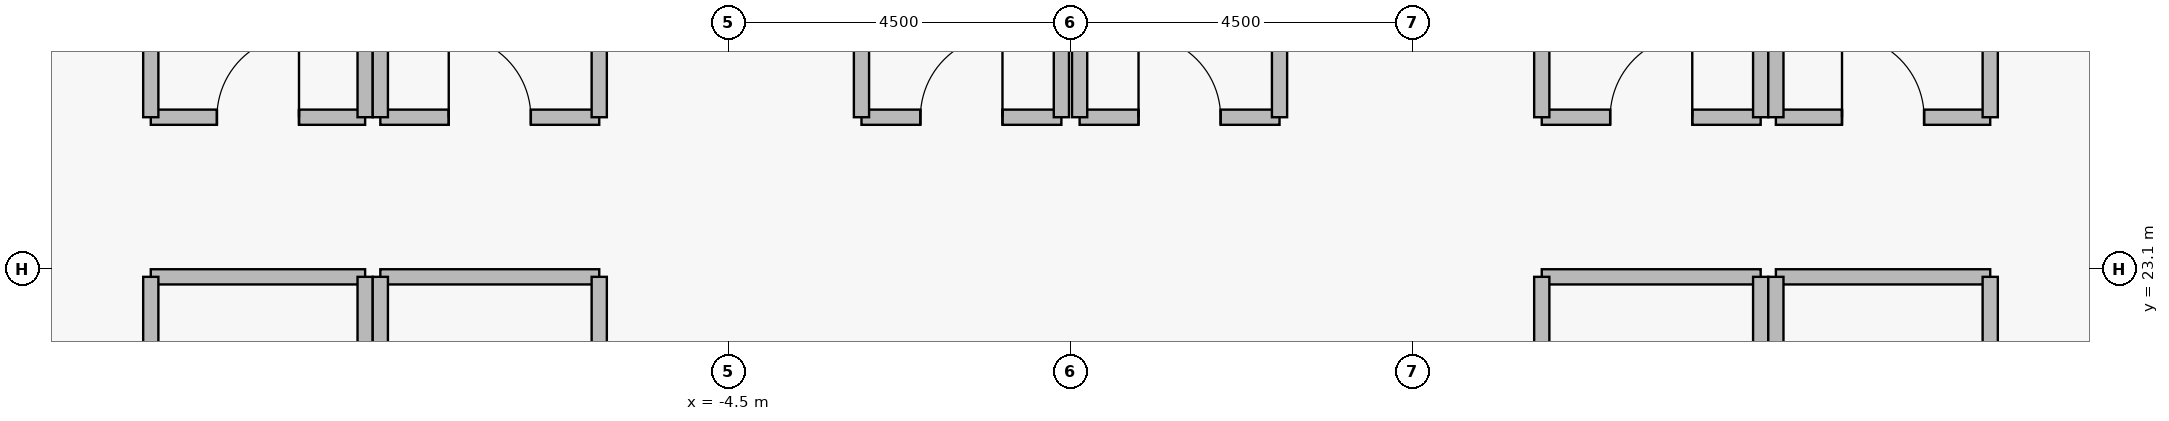
"""IFC4 building model, lengths in metres.
Left out: names, types, materials, properties, quantities, classifications, styles, units other than length and angle.
Written with IfcOpenShell. Run it as: python <this file> out.ifc"""

import sys

from ifc_helpers import new_model, si_unit, direction, frame, frame_2d, origin, place, context, subcontext, project, spatial, rectangle, extrude, element, fill, save


model = new_model("IFC4")
c1 = context("Model", 3, precision=1e-05, world=origin(), true_north=direction((0.0, 1.0)))
c2 = subcontext(c1, "Body", "Model", "MODEL_VIEW")
j1 = project(units=[si_unit("LENGTHUNIT", "METRE"), si_unit("PLANEANGLEUNIT", "RADIAN")], contexts=[c1])
p1 = place(None, origin())
s1 = spatial("IfcSite", under=j1, at=p1, CompositionType="ELEMENT")
p2 = place(p1, origin())
s2 = spatial("IfcBuilding", under=s1, at=p2, CompositionType="ELEMENT")
p3 = place(p2, frame((0.0, 0.0, 233.65)))
s3 = spatial("IfcBuildingStorey", under=s2, at=p3, CompositionType="ELEMENT", Elevation=233.65)
p4 = place(p3, frame((-12.1, 25.1, 0.0), z_axis=(0.0, 0.0, 1.0), x_axis=(1.0, 0.0, 0.0)))
e1 = element("IfcWall", 1, at=p4, inside=s3, PredefinedType="PARTITIONING", context=c2, shape_type="SweptSolid", body=[
    extrude(rectangle(XDim=2.82, YDim=0.2, at=frame_2d((1.41, 0.0))), origin(), (0.0, 0.0, 1.0), 5.336),
])
p5 = place(p4, frame((0.87, 0.0, 0.0)))
e2 = element("IfcOpeningElement", 2, at=p5, cuts=e1, PredefinedType="OPENING", context=c2, shape_type="SweptSolid", body=[
    extrude(rectangle(XDim=1.08, YDim=2.18, at=frame_2d((0.54, 1.09))), frame((0.0, 0.11, 0.0), z_axis=(0.0, -1.0, 0.0), x_axis=(1.0, 0.0, 0.0)), (0.0, 0.0, 1.0), 0.22),
])
p6 = place(p3, frame((-9.08, 25.1, 0.0), z_axis=(0.0, 0.0, 1.0), x_axis=(1.0, 0.0, 0.0)))
e3 = element("IfcWall", 3, at=p6, inside=s3, PredefinedType="PARTITIONING", context=c2, shape_type="SweptSolid", body=[
    extrude(rectangle(XDim=2.88, YDim=0.2, at=frame_2d((1.44, 0.0))), origin(), (0.0, 0.0, 1.0), 5.336),
])
p7 = place(p6, frame((0.9, 0.0, 0.0)))
e4 = element("IfcOpeningElement", 4, at=p7, cuts=e3, PredefinedType="OPENING", context=c2, shape_type="SweptSolid", body=[
    extrude(rectangle(XDim=1.08, YDim=2.18, at=frame_2d((0.54, 1.09))), frame((0.0, 0.11, 0.0), z_axis=(0.0, -1.0, 0.0), x_axis=(1.0, 0.0, 0.0)), (0.0, 0.0, 1.0), 0.22),
])
p8 = place(p3, frame((-2.75, 25.1, 0.0), z_axis=(0.0, 0.0, 1.0), x_axis=(1.0, 0.0, 0.0)))
e5 = element("IfcWall", 5, at=p8, inside=s3, PredefinedType="PARTITIONING", context=c2, shape_type="SweptSolid", body=[
    extrude(rectangle(XDim=2.63, YDim=0.2, at=frame_2d((1.315, 0.0))), origin(), (0.0, 0.0, 1.0), 5.336),
])
p9 = place(p8, frame((0.775, 0.0, 0.0)))
e6 = element("IfcOpeningElement", 6, at=p9, cuts=e5, PredefinedType="OPENING", context=c2, shape_type="SweptSolid", body=[
    extrude(rectangle(XDim=1.08, YDim=2.18, at=frame_2d((0.54, 1.09))), frame((0.0, 0.11, 0.0), z_axis=(0.0, -1.0, 0.0), x_axis=(1.0, 0.0, 0.0)), (0.0, 0.0, 1.0), 0.22),
])
p10 = place(p3, frame((0.12, 25.1, 0.0), z_axis=(0.0, 0.0, 1.0), x_axis=(1.0, 0.0, 0.0)))
e7 = element("IfcWall", 7, at=p10, inside=s3, PredefinedType="PARTITIONING", context=c2, shape_type="SweptSolid", body=[
    extrude(rectangle(XDim=2.63, YDim=0.2, at=frame_2d((1.315, 0.0))), origin(), (0.0, 0.0, 1.0), 5.336),
])
p11 = place(p10, frame((0.775, 0.0, 0.0)))
e8 = element("IfcOpeningElement", 8, at=p11, cuts=e7, PredefinedType="OPENING", context=c2, shape_type="SweptSolid", body=[
    extrude(rectangle(XDim=1.08, YDim=2.18, at=frame_2d((0.54, 1.09))), frame((0.0, 0.11, 0.0), z_axis=(0.0, -1.0, 0.0), x_axis=(1.0, 0.0, 0.0)), (0.0, 0.0, 1.0), 0.22),
])
p12 = place(p3, frame((6.2, 25.1, 0.0), z_axis=(0.0, 0.0, 1.0), x_axis=(1.0, 0.0, 0.0)))
e9 = element("IfcWall", 9, at=p12, inside=s3, PredefinedType="PARTITIONING", context=c2, shape_type="SweptSolid", body=[
    extrude(rectangle(XDim=2.88, YDim=0.2, at=frame_2d((1.44, 0.0))), origin(), (0.0, 0.0, 1.0), 5.336),
])
p13 = place(p12, frame((0.9, 0.0, 0.0)))
e10 = element("IfcOpeningElement", 10, at=p13, cuts=e9, PredefinedType="OPENING", context=c2, shape_type="SweptSolid", body=[
    extrude(rectangle(XDim=1.08, YDim=2.18, at=frame_2d((0.54, 1.09))), frame((0.0, 0.11, 0.0), z_axis=(0.0, -1.0, 0.0), x_axis=(1.0, 0.0, 0.0)), (0.0, 0.0, 1.0), 0.22),
])
p14 = place(p3, frame((9.28, 25.1, 0.0), z_axis=(0.0, 0.0, 1.0), x_axis=(1.0, 0.0, 0.0)))
e11 = element("IfcWall", 11, at=p14, inside=s3, PredefinedType="PARTITIONING", context=c2, shape_type="SweptSolid", body=[
    extrude(rectangle(XDim=2.82, YDim=0.2, at=frame_2d((1.41, 0.0))), origin(), (0.0, 0.0, 1.0), 5.336),
])
p15 = place(p14, frame((0.87, 0.0, 0.0)))
e12 = element("IfcOpeningElement", 12, at=p15, cuts=e11, PredefinedType="OPENING", context=c2, shape_type="SweptSolid", body=[
    extrude(rectangle(XDim=1.08, YDim=2.18, at=frame_2d((0.54, 1.09))), frame((0.0, 0.11, 0.0), z_axis=(0.0, -1.0, 0.0), x_axis=(1.0, 0.0, 0.0)), (0.0, 0.0, 1.0), 0.22),
])
p16 = place(p3, frame((-12.1, 23.0, 0.0), z_axis=(0.0, 0.0, 1.0), x_axis=(1.0, 0.0, 0.0)))
e13 = element("IfcWall", 13, at=p16, inside=s3, PredefinedType="PARTITIONING", context=c2, shape_type="SweptSolid", body=[
    extrude(rectangle(XDim=2.82, YDim=0.2, at=frame_2d((1.41, 0.0))), origin(), (0.0, 0.0, 1.0), 5.74),
])
for number, where, z_axis, x_axis in (
    (14, (-12.1, 17.1, 0.0), (0.0, 0.0, 1.0), (0.0, 1.0, 0.0)),
    (15, (-9.28, 17.1, 0.0), (0.0, 0.0, 1.0), (0.0, 1.0, 0.0)),
):
    element("IfcWall", number, at=place(p3, frame(where, z_axis=z_axis, x_axis=x_axis)), inside=s3, PredefinedType="PARTITIONING", context=c2, shape_type="SweptSolid", body=[
        extrude(rectangle(XDim=5.9, YDim=0.2, at=frame_2d((2.95, 0.0))), origin(), (0.0, 0.0, 1.0), 5.74),
    ])
p17 = place(p3, frame((-9.08, 23.0, 0.0), z_axis=(0.0, 0.0, 1.0), x_axis=(1.0, 0.0, 0.0)))
e16 = element("IfcWall", 16, at=p17, inside=s3, PredefinedType="PARTITIONING", context=c2, shape_type="SweptSolid", body=[
    extrude(rectangle(XDim=2.88, YDim=0.2, at=frame_2d((1.44, 0.0))), origin(), (0.0, 0.0, 1.0), 5.74),
])
for number, where, z_axis, x_axis in (
    (17, (-9.08, 17.1, 0.0), (0.0, 0.0, 1.0), (0.0, 1.0, 0.0)),
    (18, (-6.2, 17.1, 0.0), (0.0, 0.0, 1.0), (0.0, 1.0, 0.0)),
):
    element("IfcWall", number, at=place(p3, frame(where, z_axis=z_axis, x_axis=x_axis)), inside=s3, PredefinedType="PARTITIONING", context=c2, shape_type="SweptSolid", body=[
        extrude(rectangle(XDim=5.9, YDim=0.2, at=frame_2d((2.95, 0.0))), origin(), (0.0, 0.0, 1.0), 5.74),
    ])
p18 = place(p3, frame((6.2, 23.0, 0.0), z_axis=(0.0, 0.0, 1.0), x_axis=(1.0, 0.0, 0.0)))
e19 = element("IfcWall", 19, at=p18, inside=s3, PredefinedType="PARTITIONING", context=c2, shape_type="SweptSolid", body=[
    extrude(rectangle(XDim=2.88, YDim=0.2, at=frame_2d((1.44, 0.0))), origin(), (0.0, 0.0, 1.0), 5.74),
])
for number, where, z_axis, x_axis in (
    (20, (6.2, 17.1, 0.0), (0.0, 0.0, 1.0), (0.0, 1.0, 0.0)),
    (21, (9.08, 17.1, 0.0), (0.0, 0.0, 1.0), (0.0, 1.0, 0.0)),
):
    element("IfcWall", number, at=place(p3, frame(where, z_axis=z_axis, x_axis=x_axis)), inside=s3, PredefinedType="PARTITIONING", context=c2, shape_type="SweptSolid", body=[
        extrude(rectangle(XDim=5.9, YDim=0.2, at=frame_2d((2.95, 0.0))), origin(), (0.0, 0.0, 1.0), 5.74),
    ])
p19 = place(p3, frame((9.28, 23.0, 0.0), z_axis=(0.0, 0.0, 1.0), x_axis=(1.0, 0.0, 0.0)))
e22 = element("IfcWall", 22, at=p19, inside=s3, PredefinedType="PARTITIONING", context=c2, shape_type="SweptSolid", body=[
    extrude(rectangle(XDim=2.82, YDim=0.2, at=frame_2d((1.41, 0.0))), origin(), (0.0, 0.0, 1.0), 5.74),
])
for number, where, z_axis, x_axis in (
    (23, (9.28, 17.1, 0.0), (0.0, 0.0, 1.0), (0.0, 1.0, 0.0)),
    (24, (12.1, 17.1, 0.0), (0.0, 0.0, 1.0), (0.0, 1.0, 0.0)),
):
    element("IfcWall", number, at=place(p3, frame(where, z_axis=z_axis, x_axis=x_axis)), inside=s3, PredefinedType="PARTITIONING", context=c2, shape_type="SweptSolid", body=[
        extrude(rectangle(XDim=5.9, YDim=0.2, at=frame_2d((2.95, 0.0))), origin(), (0.0, 0.0, 1.0), 5.74),
    ])
for number, where, z_axis, x_axis in (
    (25, (-12.1, 25.1, 0.0), (0.0, 0.0, 1.0), (0.0, 1.0, 0.0)),
    (26, (-9.28, 25.1, 0.0), (0.0, 0.0, 1.0), (0.0, 1.0, 0.0)),
    (27, (-9.08, 25.1, 0.0), (0.0, 0.0, 1.0), (0.0, 1.0, 0.0)),
    (28, (-6.2, 25.1, 0.0), (0.0, 0.0, 1.0), (0.0, 1.0, 0.0)),
    (29, (-2.75, 25.1, 0.0), (0.0, 0.0, 1.0), (0.0, 1.0, 0.0)),
    (30, (-0.12, 25.1, 0.0), (0.0, 0.0, 1.0), (0.0, 1.0, 0.0)),
    (31, (0.12, 25.1, 0.0), (0.0, 0.0, 1.0), (0.0, 1.0, 0.0)),
    (32, (2.75, 25.1, 0.0), (0.0, 0.0, 1.0), (0.0, 1.0, 0.0)),
    (33, (6.2, 25.1, 0.0), (0.0, 0.0, 1.0), (0.0, 1.0, 0.0)),
    (34, (9.08, 25.1, 0.0), (0.0, 0.0, 1.0), (0.0, 1.0, 0.0)),
    (35, (9.28, 25.1, 0.0), (0.0, 0.0, 1.0), (0.0, 1.0, 0.0)),
    (36, (12.1, 25.1, 0.0), (0.0, 0.0, 1.0), (0.0, 1.0, 0.0)),
):
    element("IfcWall", number, at=place(p3, frame(where, z_axis=z_axis, x_axis=x_axis)), inside=s3, PredefinedType="PARTITIONING", context=c2, shape_type="SweptSolid", body=[
        extrude(rectangle(XDim=6.1, YDim=0.2, at=frame_2d((3.05, 0.0))), origin(), (0.0, 0.0, 1.0), 5.74),
    ])
p20 = place(p5, origin())
e37 = element("IfcDoor", 37, at=p20, inside=s3, OperationType="SINGLE_SWING_RIGHT", PredefinedType="DOOR", context=c2, shape_type="SweptSolid", body=[
    extrude(rectangle(XDim=1.08, YDim=2.18, at=frame_2d((0.54, 1.09))), frame((0.0, 0.025, 0.0), z_axis=(0.0, -1.0, 0.0), x_axis=(1.0, 0.0, 0.0)), (0.0, 0.0, 1.0), 0.05),
])
fill(e2, e37)
p21 = place(p7, origin())
e38 = element("IfcDoor", 38, at=p21, inside=s3, OperationType="SINGLE_SWING_LEFT", PredefinedType="DOOR", context=c2, shape_type="SweptSolid", body=[
    extrude(rectangle(XDim=1.08, YDim=2.18, at=frame_2d((0.54, 1.09))), frame((0.0, 0.025, 0.0), z_axis=(0.0, -1.0, 0.0), x_axis=(1.0, 0.0, 0.0)), (0.0, 0.0, 1.0), 0.05),
])
fill(e4, e38)
p22 = place(p9, origin())
e39 = element("IfcDoor", 39, at=p22, inside=s3, OperationType="SINGLE_SWING_RIGHT", PredefinedType="DOOR", context=c2, shape_type="SweptSolid", body=[
    extrude(rectangle(XDim=1.08, YDim=2.18, at=frame_2d((0.54, 1.09))), frame((0.0, 0.025, 0.0), z_axis=(0.0, -1.0, 0.0), x_axis=(1.0, 0.0, 0.0)), (0.0, 0.0, 1.0), 0.05),
])
fill(e6, e39)
p23 = place(p11, origin())
e40 = element("IfcDoor", 40, at=p23, inside=s3, OperationType="SINGLE_SWING_LEFT", PredefinedType="DOOR", context=c2, shape_type="SweptSolid", body=[
    extrude(rectangle(XDim=1.08, YDim=2.18, at=frame_2d((0.54, 1.09))), frame((0.0, 0.025, 0.0), z_axis=(0.0, -1.0, 0.0), x_axis=(1.0, 0.0, 0.0)), (0.0, 0.0, 1.0), 0.05),
])
fill(e8, e40)
p24 = place(p13, origin())
e41 = element("IfcDoor", 41, at=p24, inside=s3, OperationType="SINGLE_SWING_RIGHT", PredefinedType="DOOR", context=c2, shape_type="SweptSolid", body=[
    extrude(rectangle(XDim=1.08, YDim=2.18, at=frame_2d((0.54, 1.09))), frame((0.0, 0.025, 0.0), z_axis=(0.0, -1.0, 0.0), x_axis=(1.0, 0.0, 0.0)), (0.0, 0.0, 1.0), 0.05),
])
fill(e10, e41)
p25 = place(p15, origin())
e42 = element("IfcDoor", 42, at=p25, inside=s3, OperationType="SINGLE_SWING_LEFT", PredefinedType="DOOR", context=c2, shape_type="SweptSolid", body=[
    extrude(rectangle(XDim=1.08, YDim=2.18, at=frame_2d((0.54, 1.09))), frame((0.0, 0.025, 0.0), z_axis=(0.0, -1.0, 0.0), x_axis=(1.0, 0.0, 0.0)), (0.0, 0.0, 1.0), 0.05),
])
fill(e12, e42)
save(model, sys.argv[1])
